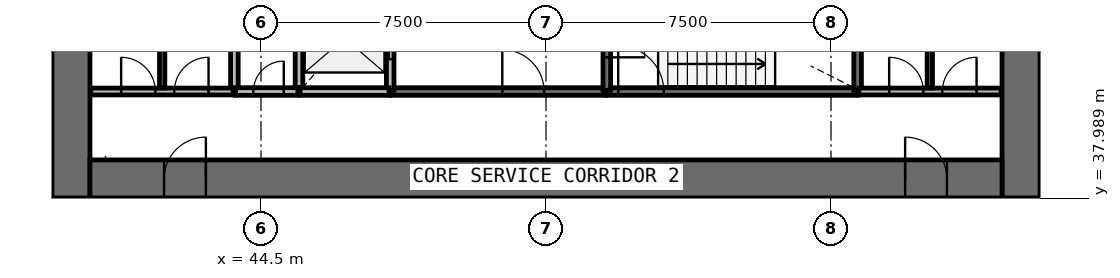
"""IFC4 building model, lengths in metres.
Left out: names, types, materials, properties, quantities, classifications, styles, units other than length and angle.
Written with IfcOpenShell. Run it as: python <this file> out.ifc"""

import sys

from ifc_helpers import new_model, si_unit, direction, frame, frame_2d, origin, place, context, subcontext, project, spatial, rectangle, extrude, source, transform, mapped, element, fill, save


model = new_model("IFC4")
c1 = context("Model", 3, precision=1e-05, world=origin(), true_north=direction((0.0, 1.0)))
c2 = subcontext(c1, "Body", "Model", "MODEL_VIEW")
j1 = project(units=[si_unit("LENGTHUNIT", "METRE"), si_unit("PLANEANGLEUNIT", "RADIAN")], contexts=[c1])
p1 = place(None, origin())
s1 = spatial("IfcSite", under=j1, at=p1, CompositionType="ELEMENT")
p2 = place(p1, origin())
s2 = spatial("IfcBuilding", under=s1, at=p2, CompositionType="ELEMENT")
p3 = place(p2, frame((0.0, 0.0, 35.8)))
s3 = spatial("IfcBuildingStorey", under=s2, at=p3, CompositionType="ELEMENT", Elevation=35.8)
p4 = place(p3, frame((64.5, 38.0, 0.0), z_axis=(0.0, 0.0, 1.0), x_axis=(0.0, 1.0, 0.0)))
e1 = element("IfcWall", 1, at=p4, inside=s3, PredefinedType="SHEAR", context=c2, shape_type="SweptSolid", body=[
    extrude(rectangle(XDim=20.0, YDim=1.0, at=frame_2d((10.0, 0.0))), origin(), (0.0, 0.0, 1.0), 4.4),
])
p5 = place(p4, frame((9.1, 0.0, 0.0)))
e2 = element("IfcOpeningElement", 2, at=p5, cuts=e1, PredefinedType="OPENING", context=c2, shape_type="SweptSolid", body=[
    extrude(rectangle(XDim=1.8, YDim=2.1, at=frame_2d((0.9, 1.05))), frame((0.0, 0.51, 0.0), z_axis=(0.0, -1.0, 0.0), x_axis=(1.0, 0.0, 0.0)), (0.0, 0.0, 1.0), 1.02),
])
p6 = place(p3, frame((39.5, 58.0, 0.0), z_axis=(0.0, 0.0, 1.0), x_axis=(0.0, -1.0, 0.0)))
e3 = element("IfcWall", 3, at=p6, inside=s3, PredefinedType="SHEAR", context=c2, shape_type="SweptSolid", body=[
    extrude(rectangle(XDim=20.0, YDim=1.0, at=frame_2d((10.0, 0.0))), origin(), (0.0, 0.0, 1.0), 4.4),
])
p7 = place(p6, frame((9.1, 0.0, 0.0)))
e4 = element("IfcOpeningElement", 4, at=p7, cuts=e3, PredefinedType="OPENING", context=c2, shape_type="SweptSolid", body=[
    extrude(rectangle(XDim=1.8, YDim=2.1, at=frame_2d((0.9, 1.05))), frame((0.0, 0.51, 0.0), z_axis=(0.0, -1.0, 0.0), x_axis=(1.0, 0.0, 0.0)), (0.0, 0.0, 1.0), 1.02),
])
p8 = place(p3, frame((40.0, 38.5, 0.0), z_axis=(0.0, 0.0, 1.0), x_axis=(1.0, 0.0, 0.0)))
e5 = element("IfcWall", 5, at=p8, inside=s3, PredefinedType="SHEAR", context=c2, shape_type="SweptSolid", body=[
    extrude(rectangle(XDim=24.0, YDim=1.0, at=frame_2d((12.0, 0.0))), origin(), (0.0, 0.0, 1.0), 4.4),
])
p9 = place(p8, frame((21.45, 0.0, 0.0)))
e6 = element("IfcOpeningElement", 6, at=p9, cuts=e5, PredefinedType="OPENING", context=c2, shape_type="SweptSolid", body=[
    extrude(rectangle(XDim=1.1, YDim=2.1, at=frame_2d((0.55, 1.05))), frame((0.0, 0.51, 0.0), z_axis=(0.0, -1.0, 0.0), x_axis=(1.0, 0.0, 0.0)), (0.0, 0.0, 1.0), 1.02),
])
p10 = place(p8, frame((1.95, 0.0, 0.0)))
e7 = element("IfcOpeningElement", 7, at=p10, cuts=e5, PredefinedType="OPENING", context=c2, shape_type="SweptSolid", body=[
    extrude(rectangle(XDim=1.1, YDim=2.1, at=frame_2d((0.55, 1.05))), frame((0.0, 0.51, 0.0), z_axis=(0.0, -1.0, 0.0), x_axis=(1.0, 0.0, 0.0)), (0.0, 0.0, 1.0), 1.02),
])
p11 = place(p3, frame((53.6, 40.8, 0.0), z_axis=(0.0, 0.0, 1.0), x_axis=(1.0, 0.0, 0.0)))
e8 = element("IfcWall", 8, at=p11, inside=s3, PredefinedType="SOLIDWALL", context=c2, shape_type="SweptSolid", body=[
    extrude(rectangle(XDim=6.6, YDim=0.2, at=frame_2d((3.3, 0.0))), origin(), (0.0, 0.0, 1.0), 3.95),
])
p12 = place(p11, frame((0.3, 0.0, 0.0)))
e9 = element("IfcOpeningElement", 9, at=p12, cuts=e8, PredefinedType="OPENING", context=c2, shape_type="SweptSolid", body=[
    extrude(rectangle(XDim=1.2, YDim=2.1, at=frame_2d((0.6, 1.05))), frame((0.0, 0.11, 0.0), z_axis=(0.0, -1.0, 0.0), x_axis=(1.0, 0.0, 0.0)), (0.0, 0.0, 1.0), 0.22),
])
p13 = place(p3, frame((47.9, 40.8, 0.0), z_axis=(0.0, 0.0, 1.0), x_axis=(1.0, 0.0, 0.0)))
e10 = element("IfcWall", 10, at=p13, inside=s3, PredefinedType="SOLIDWALL", context=c2, shape_type="SweptSolid", body=[
    extrude(rectangle(XDim=5.67, YDim=0.2, at=frame_2d((2.835, 0.0))), origin(), (0.0, 0.0, 1.0), 3.95),
])
p14 = place(p13, frame((2.95, 0.0, 0.0)))
e11 = element("IfcOpeningElement", 11, at=p14, cuts=e10, PredefinedType="OPENING", context=c2, shape_type="SweptSolid", body=[
    extrude(rectangle(XDim=1.1, YDim=2.1, at=frame_2d((0.55, 1.05))), frame((0.0, 0.11, 0.0), z_axis=(0.0, -1.0, 0.0), x_axis=(1.0, 0.0, 0.0)), (0.0, 0.0, 1.0), 0.22),
])
for number, where, z_axis, x_axis in (
    (12, (43.8, 43.6, 0.0), (0.0, 0.0, 1.0), (0.0, -1.0, 0.0)),
    (13, (45.5, 43.6, 0.0), (0.0, 0.0, 1.0), (0.0, -1.0, 0.0)),
):
    element("IfcWall", number, at=place(p3, frame(where, z_axis=z_axis, x_axis=x_axis)), inside=s3, PredefinedType="SOLIDWALL", context=c2, shape_type="SweptSolid", body=[
        extrude(rectangle(XDim=2.8, YDim=0.2, at=frame_2d((1.4, 0.0))), origin(), (0.0, 0.0, 1.0), 3.95),
    ])
p15 = place(p3, frame((47.9, 40.83, 0.0), z_axis=(0.0, 0.0, 1.0), x_axis=(0.0, 1.0, 0.0)))
e14 = element("IfcWall", 14, at=p15, inside=s3, PredefinedType="SOLIDWALL", context=c2, shape_type="SweptSolid", body=[
    extrude(rectangle(XDim=2.77, YDim=0.2, at=frame_2d((1.385, 0.0))), origin(), (0.0, 0.0, 1.0), 3.95),
])
p16 = place(p15, frame((0.82, 0.0, 0.0)))
e15 = element("IfcOpeningElement", 15, at=p16, cuts=e14, PredefinedType="OPENING", context=c2, shape_type="SweptSolid", body=[
    extrude(rectangle(XDim=1.1, YDim=2.1, at=frame_2d((0.55, 1.05))), frame((0.0, 0.11, 0.0), z_axis=(0.0, -1.0, 0.0), x_axis=(1.0, 0.0, 0.0)), (0.0, 0.0, 1.0), 0.22),
])
p17 = place(p3, frame((60.2, 40.83, 0.0), z_axis=(0.0, 0.0, 1.0), x_axis=(0.0, 1.0, 0.0)))
e16 = element("IfcWall", 16, at=p17, inside=s3, PredefinedType="SOLIDWALL", context=c2, shape_type="SweptSolid", body=[
    extrude(rectangle(XDim=2.77, YDim=0.2, at=frame_2d((1.385, 0.0))), origin(), (0.0, 0.0, 1.0), 3.95),
])
p18 = place(p3, frame((53.6, 43.6, 0.0), z_axis=(0.0, 0.0, 1.0), x_axis=(0.0, -1.0, 0.0)))
e17 = element("IfcWall", 17, at=p18, inside=s3, PredefinedType="SOLIDWALL", context=c2, shape_type="SweptSolid", body=[
    extrude(rectangle(XDim=2.77, YDim=0.2, at=frame_2d((1.385, 0.0))), origin(), (0.0, 0.0, 1.0), 3.95),
])
p19 = place(p18, frame((0.9, 0.0, 0.0)))
e18 = element("IfcOpeningElement", 18, at=p19, cuts=e17, PredefinedType="OPENING", context=c2, shape_type="SweptSolid", body=[
    extrude(rectangle(XDim=1.0, YDim=2.1, at=frame_2d((0.5, 1.05))), frame((0.0, 0.11, 0.0), z_axis=(0.0, -1.0, 0.0), x_axis=(1.0, 0.0, 0.0)), (0.0, 0.0, 1.0), 0.22),
])
p20 = place(p3, frame((45.53, 40.8, 0.0), z_axis=(0.0, 0.0, 1.0), x_axis=(1.0, 0.0, 0.0)))
e19 = element("IfcWall", 19, at=p20, inside=s3, PredefinedType="SOLIDWALL", context=c2, shape_type="SweptSolid", body=[
    extrude(rectangle(XDim=2.34, YDim=0.2, at=frame_2d((1.17, 0.0))), origin(), (0.0, 0.0, 1.0), 3.95),
])
p21 = place(p3, frame((43.83, 40.8, 0.0), z_axis=(0.0, 0.0, 1.0), x_axis=(1.0, 0.0, 0.0)))
e20 = element("IfcWall", 20, at=p21, inside=s3, PredefinedType="SOLIDWALL", context=c2, shape_type="SweptSolid", body=[
    extrude(rectangle(XDim=1.64, YDim=0.2, at=frame_2d((0.82, 0.0))), origin(), (0.0, 0.0, 1.0), 3.95),
])
p22 = place(p21, frame((0.47, 0.0, 0.0)))
e21 = element("IfcOpeningElement", 21, at=p22, cuts=e20, PredefinedType="OPENING", context=c2, shape_type="SweptSolid", body=[
    extrude(rectangle(XDim=0.8, YDim=2.1, at=frame_2d((0.4, 1.05))), frame((0.0, 0.11, 0.0), z_axis=(0.0, -1.0, 0.0), x_axis=(1.0, 0.0, 0.0)), (0.0, 0.0, 1.0), 0.22),
])
p23 = place(p3, frame((40.02, 40.8, 0.0), z_axis=(0.0, 0.0, 1.0), x_axis=(1.0, 0.0, 0.0)))
e22 = element("IfcWall", 22, at=p23, inside=s3, PredefinedType="PARTITIONING", context=c2, shape_type="SweptSolid", body=[
    extrude(rectangle(XDim=3.75, YDim=0.18, at=frame_2d((1.875, 0.0))), origin(), (0.0, 0.0, 1.0), 3.95),
])
p24 = place(p23, frame((0.8, 0.0, 0.0)))
e23 = element("IfcOpeningElement", 23, at=p24, cuts=e22, PredefinedType="OPENING", context=c2, shape_type="SweptSolid", body=[
    extrude(rectangle(XDim=0.9, YDim=2.1, at=frame_2d((0.45, 1.05))), frame((0.0, 0.1, 0.0), z_axis=(0.0, -1.0, 0.0), x_axis=(1.0, 0.0, 0.0)), (0.0, 0.0, 1.0), 0.2),
])
p25 = place(p23, frame((2.2, 0.0, 0.0)))
e24 = element("IfcOpeningElement", 24, at=p25, cuts=e22, PredefinedType="OPENING", context=c2, shape_type="SweptSolid", body=[
    extrude(rectangle(XDim=0.9, YDim=2.1, at=frame_2d((0.45, 1.05))), frame((0.0, 0.1, 0.0), z_axis=(0.0, -1.0, 0.0), x_axis=(1.0, 0.0, 0.0)), (0.0, 0.0, 1.0), 0.2),
])
p26 = place(p3, frame((60.23, 40.8, 0.0), z_axis=(0.0, 0.0, 1.0), x_axis=(1.0, 0.0, 0.0)))
e25 = element("IfcWall", 25, at=p26, inside=s3, PredefinedType="PARTITIONING", context=c2, shape_type="SweptSolid", body=[
    extrude(rectangle(XDim=3.75, YDim=0.18, at=frame_2d((1.875, 0.0))), origin(), (0.0, 0.0, 1.0), 3.95),
])
p27 = place(p26, frame((0.8, 0.0, 0.0)))
e26 = element("IfcOpeningElement", 26, at=p27, cuts=e25, PredefinedType="OPENING", context=c2, shape_type="SweptSolid", body=[
    extrude(rectangle(XDim=0.9, YDim=2.1, at=frame_2d((0.45, 1.05))), frame((0.0, 0.1, 0.0), z_axis=(0.0, -1.0, 0.0), x_axis=(1.0, 0.0, 0.0)), (0.0, 0.0, 1.0), 0.2),
])
p28 = place(p26, frame((2.2, 0.0, 0.0)))
e27 = element("IfcOpeningElement", 27, at=p28, cuts=e25, PredefinedType="OPENING", context=c2, shape_type="SweptSolid", body=[
    extrude(rectangle(XDim=0.9, YDim=2.1, at=frame_2d((0.45, 1.05))), frame((0.0, 0.1, 0.0), z_axis=(0.0, -1.0, 0.0), x_axis=(1.0, 0.0, 0.0)), (0.0, 0.0, 1.0), 0.2),
])
for number, where, z_axis, x_axis in (
    (28, (41.9, 40.89, 0.0), (0.0, 0.0, 1.0), (0.0, 1.0, 0.0)),
    (29, (62.1, 40.89, 0.0), (0.0, 0.0, 1.0), (0.0, 1.0, 0.0)),
):
    element("IfcWall", number, at=place(p3, frame(where, z_axis=z_axis, x_axis=x_axis)), inside=s3, PredefinedType="PARTITIONING", context=c2, shape_type="SweptSolid", body=[
        extrude(rectangle(XDim=2.71, YDim=0.14, at=frame_2d((1.355, 0.0))), origin(), (0.0, 0.0, 1.0), 3.05),
    ])
m1 = source(origin(), c2, "Body", "SweptSolid", [
    extrude(rectangle(XDim=1.1, YDim=2.1, at=frame_2d((0.55, 1.05))), frame((0.0, 0.025, 0.0), z_axis=(0.0, -1.0, 0.0), x_axis=(1.0, 0.0, 0.0)), (0.0, 0.0, 1.0), 0.05),
])
p29 = place(p16, origin())
e30 = element("IfcDoor", 30, at=p29, inside=s3, OperationType="DOUBLE_DOOR_SLIDING", PredefinedType="USERDEFINED", context=c2, shape_type="MappedRepresentation", body=[
    mapped(m1, transform((0.0, 0.0, 0.0), scale=1.0)),
])
fill(e15, e30)
m2 = source(origin(), c2, "Body", "SweptSolid", [
    extrude(rectangle(XDim=1.2, YDim=2.1, at=frame_2d((0.6, 1.05))), frame((0.0, 0.025, 0.0), z_axis=(0.0, -1.0, 0.0), x_axis=(1.0, 0.0, 0.0)), (0.0, 0.0, 1.0), 0.05),
])
p30 = place(p12, origin())
e31 = element("IfcDoor", 31, at=p30, inside=s3, OperationType="SINGLE_SWING_LEFT", PredefinedType="DOOR", context=c2, shape_type="MappedRepresentation", body=[
    mapped(m2, transform((0.0, 0.0, 0.0), scale=1.0)),
])
fill(e9, e31)
m3 = source(origin(), c2, "Body", "SweptSolid", [
    extrude(rectangle(XDim=1.0, YDim=2.1, at=frame_2d((0.5, 1.05))), frame((0.0, 0.025, 0.0), z_axis=(0.0, -1.0, 0.0), x_axis=(1.0, 0.0, 0.0)), (0.0, 0.0, 1.0), 0.05),
])
p31 = place(p19, origin())
e32 = element("IfcDoor", 32, at=p31, inside=s3, OperationType="SINGLE_SWING_RIGHT", PredefinedType="DOOR", context=c2, shape_type="MappedRepresentation", body=[
    mapped(m3, transform((0.0, 0.0, 0.0), scale=1.0)),
])
fill(e18, e32)
m4 = source(origin(), c2, "Body", "SweptSolid", [
    extrude(rectangle(XDim=1.1, YDim=2.1, at=frame_2d((0.55, 1.05))), frame((0.0, 0.025, 0.0), z_axis=(0.0, -1.0, 0.0), x_axis=(1.0, 0.0, 0.0)), (0.0, 0.0, 1.0), 0.05),
])
p32 = place(p14, origin())
e33 = element("IfcDoor", 33, at=p32, inside=s3, OperationType="SINGLE_SWING_LEFT", PredefinedType="DOOR", context=c2, shape_type="MappedRepresentation", body=[
    mapped(m4, transform((0.0, 0.0, 0.0), scale=1.0)),
])
fill(e11, e33)
m5 = source(origin(), c2, "Body", "SweptSolid", [
    extrude(rectangle(XDim=0.8, YDim=2.1, at=frame_2d((0.4, 1.05))), frame((0.0, 0.025, 0.0), z_axis=(0.0, -1.0, 0.0), x_axis=(1.0, 0.0, 0.0)), (0.0, 0.0, 1.0), 0.05),
])
p33 = place(p22, origin())
e34 = element("IfcDoor", 34, at=p33, inside=s3, OperationType="SINGLE_SWING_RIGHT", PredefinedType="DOOR", context=c2, shape_type="MappedRepresentation", body=[
    mapped(m5, transform((0.0, 0.0, 0.0), scale=1.0)),
])
fill(e21, e34)
m6 = source(origin(), c2, "Body", "SweptSolid", [
    extrude(rectangle(XDim=1.1, YDim=2.1, at=frame_2d((0.55, 1.05))), frame((0.0, 0.025, 0.0), z_axis=(0.0, -1.0, 0.0), x_axis=(1.0, 0.0, 0.0)), (0.0, 0.0, 1.0), 0.05),
])
p34 = place(p9, origin())
e35 = element("IfcDoor", 35, at=p34, inside=s3, OperationType="SINGLE_SWING_LEFT", PredefinedType="DOOR", context=c2, shape_type="MappedRepresentation", body=[
    mapped(m6, transform((0.0, 0.0, 0.0), scale=1.0)),
])
fill(e6, e35)
p35 = place(p10, origin())
e36 = element("IfcDoor", 36, at=p35, inside=s3, OperationType="SINGLE_SWING_RIGHT", PredefinedType="DOOR", context=c2, shape_type="MappedRepresentation", body=[
    mapped(m6, transform((0.0, 0.0, 0.0), scale=1.0)),
])
fill(e7, e36)
m7 = source(origin(), c2, "Body", "SweptSolid", [
    extrude(rectangle(XDim=0.9, YDim=2.1, at=frame_2d((0.45, 1.05))), frame((0.0, 0.025, 0.0), z_axis=(0.0, -1.0, 0.0), x_axis=(1.0, 0.0, 0.0)), (0.0, 0.0, 1.0), 0.05),
])
p36 = place(p24, origin())
e37 = element("IfcDoor", 37, at=p36, inside=s3, OperationType="SINGLE_SWING_LEFT", PredefinedType="DOOR", context=c2, shape_type="MappedRepresentation", body=[
    mapped(m7, transform((0.0, 0.0, 0.0), scale=1.0)),
])
fill(e23, e37)
p37 = place(p25, origin())
e38 = element("IfcDoor", 38, at=p37, inside=s3, OperationType="SINGLE_SWING_RIGHT", PredefinedType="DOOR", context=c2, shape_type="MappedRepresentation", body=[
    mapped(m7, transform((0.0, 0.0, 0.0), scale=1.0)),
])
fill(e24, e38)
p38 = place(p27, origin())
e39 = element("IfcDoor", 39, at=p38, inside=s3, OperationType="SINGLE_SWING_LEFT", PredefinedType="DOOR", context=c2, shape_type="MappedRepresentation", body=[
    mapped(m7, transform((0.0, 0.0, 0.0), scale=1.0)),
])
fill(e26, e39)
p39 = place(p28, origin())
e40 = element("IfcDoor", 40, at=p39, inside=s3, OperationType="SINGLE_SWING_RIGHT", PredefinedType="DOOR", context=c2, shape_type="MappedRepresentation", body=[
    mapped(m7, transform((0.0, 0.0, 0.0), scale=1.0)),
])
fill(e27, e40)
save(model, sys.argv[1])
